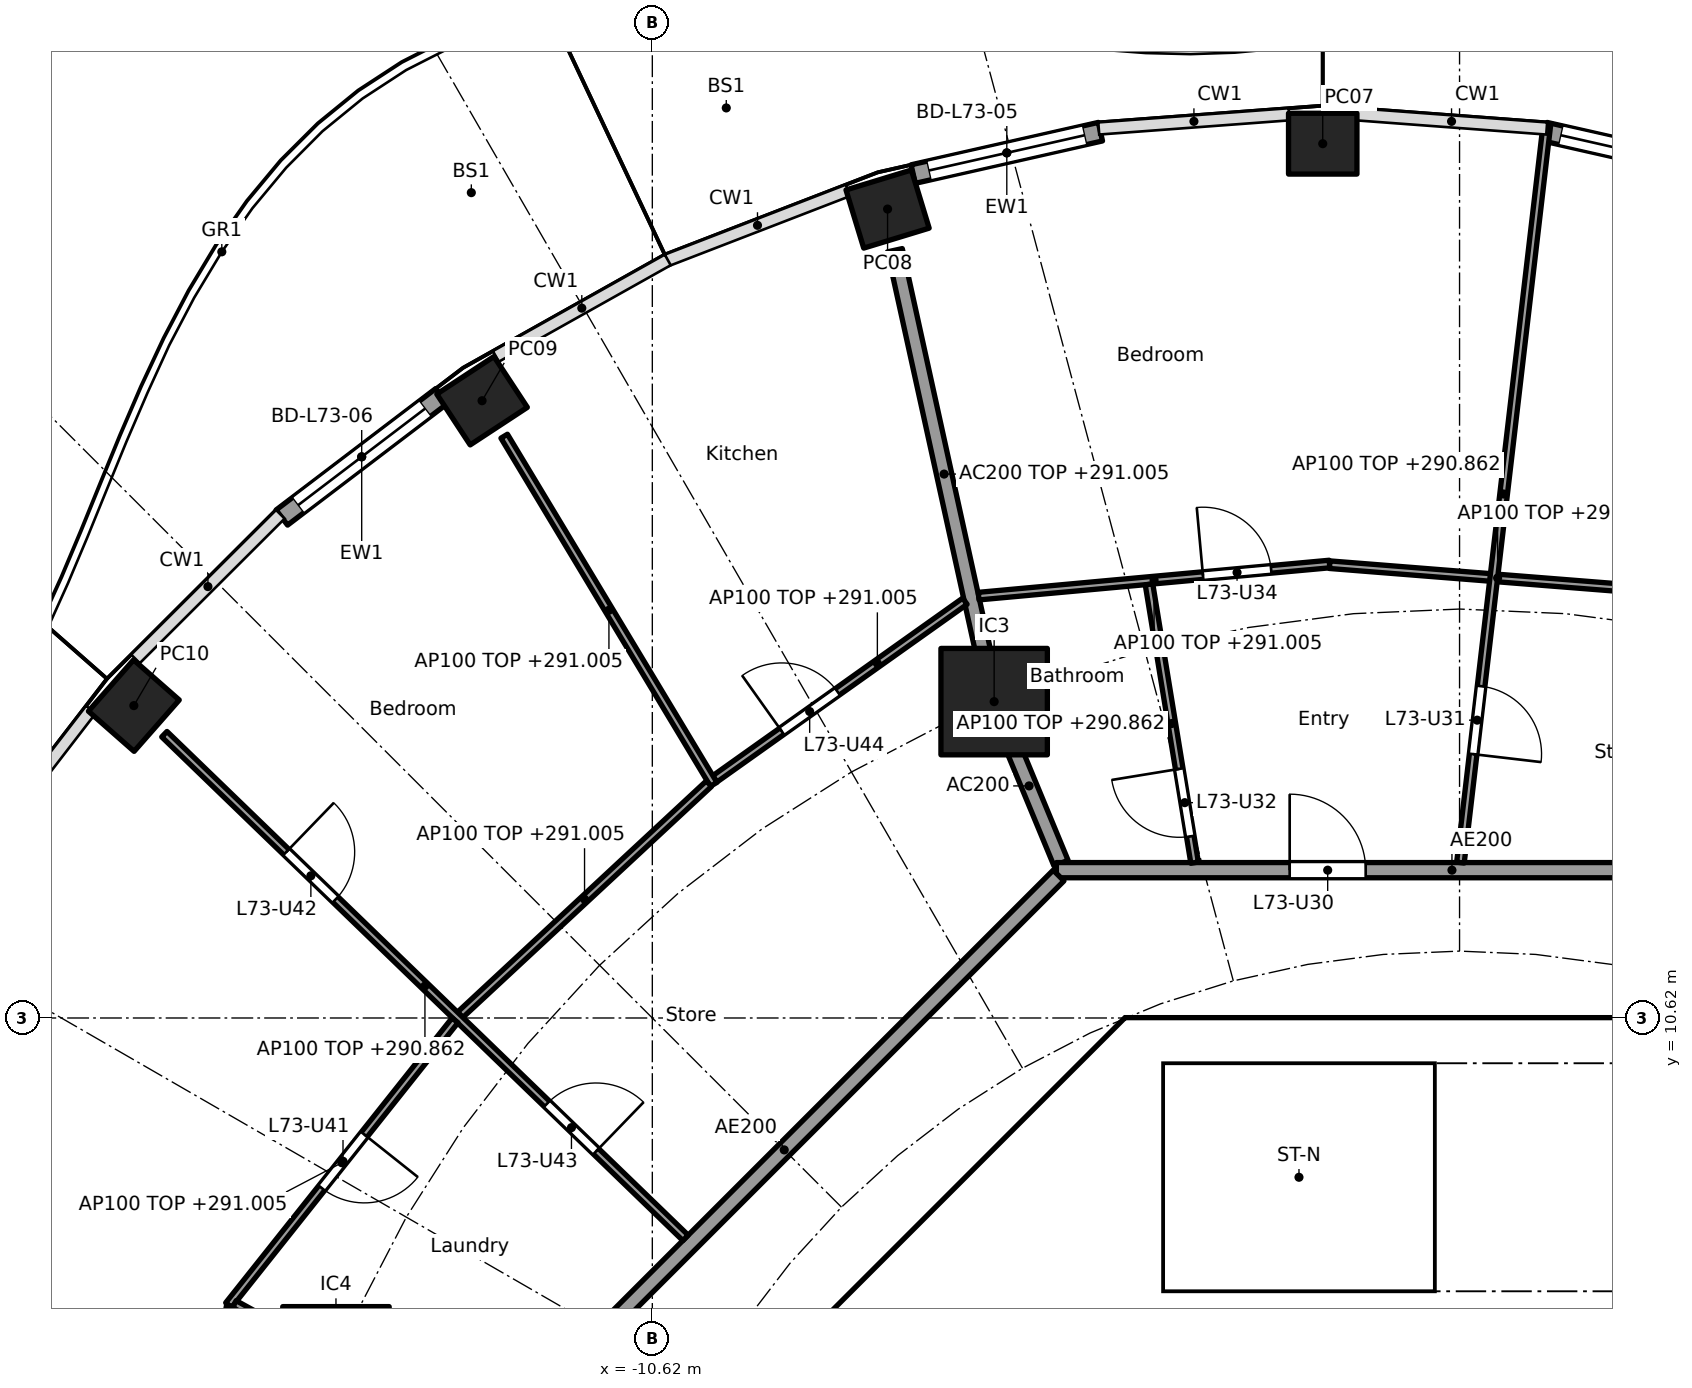
"""IFC4 building model, lengths in metres.
Left out: names, types, materials, properties, quantities, classifications, styles, units other than length and angle.
Written with IfcOpenShell. Run it as: python <this file> out.ifc"""

import sys

from ifc_helpers import new_model, si_unit, direction, frame, frame_2d, origin, origin_2d, place, context, subcontext, project, spatial, polyline, rectangle, hollow_rectangle, outline, extrude, element, fill, save


model = new_model("IFC4")
c1 = context("Model", 3, precision=1e-05, world=origin(), true_north=direction((0.0, 1.0)))
c2 = subcontext(c1, "Body", "Model", "MODEL_VIEW")
j1 = project(units=[si_unit("LENGTHUNIT", "METRE"), si_unit("PLANEANGLEUNIT", "RADIAN")], contexts=[c1])
p1 = place(None, origin())
s1 = spatial("IfcSite", under=j1, at=p1, CompositionType="ELEMENT")
p2 = place(p1, origin())
s2 = spatial("IfcBuilding", under=s1, at=p2, CompositionType="ELEMENT")
p3 = place(p2, frame((0.0, 0.0, 288.1)))
s3 = spatial("IfcBuildingStorey", under=s2, at=p3, CompositionType="ELEMENT", Elevation=288.1)
for number, where, z_axis, x_axis in (
    (1, (-1.8, 22.122, 0.0), (0.0, 0.0, 1.0), (-1.0, 0.0, 0.0)),
    (2, (-7.525, 21.262, 0.0), (0.0, 0.0, 1.0), (-0.957, -0.292, 0.0)),
    (3, (-12.86, 18.741, 0.0), (0.0, 0.0, 1.0), (-0.836, -0.549, 0.0)),
    (4, (-17.441, 14.73, 0.0), (0.0, 0.0, 1.0), (-0.66, -0.751, 0.0)),
):
    element("IfcColumn", number, at=place(p3, frame(where, z_axis=z_axis, x_axis=x_axis)), inside=s3, PredefinedType="COLUMN", context=c2, shape_type="SweptSolid", body=[
        extrude(hollow_rectangle(XDim=0.9, YDim=0.8, WallThickness=0.028, at=origin_2d()), origin(), (0.0, 0.0, 1.0), 3.7),
    ])
for number, where, z_axis, x_axis in (
    (5, (-6.123, 14.782, 0.0), (0.0, 0.0, 1.0), (1.0, 0.0, 0.0)),
    (6, (-14.782, 6.123, 0.0), (0.0, 0.0, 1.0), (1.0, 0.0, 0.0)),
):
    element("IfcColumn", number, at=place(p3, frame(where, z_axis=z_axis, x_axis=x_axis)), inside=s3, PredefinedType="COLUMN", context=c2, shape_type="SweptSolid", body=[
        extrude(rectangle(XDim=1.4, YDim=1.4, at=origin_2d()), origin(), (0.0, 0.0, 1.0), 3.7),
    ])
p4 = place(p3, frame((1.125, 22.28, 0.0), z_axis=(0.0, 0.0, 1.0), x_axis=(0.97531487046, -0.22081871175, 0.0)))
e7 = element("IfcWall", 7, at=p4, inside=s3, PredefinedType="SOLIDWALL", context=c2, shape_type="SweptSolid", body=[
    extrude(rectangle(XDim=2.525, YDim=0.25, at=frame_2d((1.263, 0.0))), origin(), (0.0, 0.0, 1.0), 3.44),
])
p5 = place(p4, frame((0.213, 0.0, 0.0)))
e8 = element("IfcOpeningElement", 8, at=p5, cuts=e7, PredefinedType="OPENING", context=c2, shape_type="SweptSolid", body=[
    extrude(rectangle(XDim=2.1, YDim=2.4, at=frame_2d((1.05, 1.2))), frame((0.0, 0.135, 0.0), z_axis=(0.0, -1.0, 0.0), x_axis=(1.0, 0.0, 0.0)), (0.0, 0.0, 1.0), 0.27),
])
p6 = place(p3, frame((-7.188, 21.723, 0.0), z_axis=(0.0, 0.0, 1.0), x_axis=(0.975319584032, 0.220797891756, 0.0)))
e9 = element("IfcWall", 9, at=p6, inside=s3, PredefinedType="SOLIDWALL", context=c2, shape_type="SweptSolid", body=[
    extrude(rectangle(XDim=2.525, YDim=0.25, at=frame_2d((1.263, 0.0))), origin(), (0.0, 0.0, 1.0), 3.44),
])
p7 = place(p6, frame((0.213, 0.0, 0.0)))
e10 = element("IfcOpeningElement", 10, at=p7, cuts=e9, PredefinedType="OPENING", context=c2, shape_type="SweptSolid", body=[
    extrude(rectangle(XDim=2.1, YDim=2.4, at=frame_2d((1.05, 1.2))), frame((0.0, 0.135, 0.0), z_axis=(0.0, -1.0, 0.0), x_axis=(1.0, 0.0, 0.0)), (0.0, 0.0, 1.0), 0.27),
])
p8 = place(p3, frame((-15.495, 17.204, 0.0), z_axis=(0.0, 0.0, 1.0), x_axis=(0.796010739377, 0.605282498339, 0.0)))
e11 = element("IfcWall", 11, at=p8, inside=s3, PredefinedType="SOLIDWALL", context=c2, shape_type="SweptSolid", body=[
    extrude(rectangle(XDim=2.641, YDim=0.25, at=frame_2d((1.32, 0.0))), origin(), (0.0, 0.0, 1.0), 3.44),
])
p9 = place(p8, frame((0.27, 0.0, 0.0)))
e12 = element("IfcOpeningElement", 12, at=p9, cuts=e11, PredefinedType="OPENING", context=c2, shape_type="SweptSolid", body=[
    extrude(rectangle(XDim=2.1, YDim=2.4, at=frame_2d((1.05, 1.2))), frame((0.0, 0.135, 0.0), z_axis=(0.0, -1.0, 0.0), x_axis=(1.0, 0.0, 0.0)), (0.0, 0.0, 1.0), 0.27),
])
p10 = place(p3, frame((-4.613, 9.988, 0.0), z_axis=(0.0, 0.0, 1.0), x_axis=(-0.707106781187, -0.707106781187, 0.0)))
e13 = element("IfcWall", 13, at=p10, inside=s3, PredefinedType="SHEAR", context=c2, shape_type="SweptSolid", body=[
    extrude(rectangle(XDim=7.602, YDim=0.6, at=frame_2d((3.801, 0.0))), origin(), (0.0, 0.0, 1.0), 3.44),
])
p11 = place(p10, frame((0.351, 0.0, 0.0)))
e14 = element("IfcOpeningElement", 14, at=p11, cuts=e13, PredefinedType="OPENING", context=c2, shape_type="SweptSolid", body=[
    extrude(rectangle(XDim=1.1, YDim=2.1, at=frame_2d((0.55, 1.05))), frame((0.0, 0.31, 0.0), z_axis=(0.0, -1.0, 0.0), x_axis=(1.0, 0.0, 0.0)), (0.0, 0.0, 1.0), 0.62),
])
p12 = place(p3, frame((-5.8, 4.3, 0.0), z_axis=(0.0, 0.0, 1.0), x_axis=(0.0, 1.0, 0.0)))
e15 = element("IfcWall", 15, at=p12, inside=s3, PredefinedType="PARTITIONING", context=c2, shape_type="SweptSolid", body=[
    extrude(rectangle(XDim=3.927, YDim=0.15, at=frame_2d((1.963, 0.0))), origin(), (0.0, 0.0, 1.0), 3.44),
])
p13 = place(p12, frame((1.551, 0.0, 0.0)))
e16 = element("IfcOpeningElement", 16, at=p13, cuts=e15, PredefinedType="OPENING", context=c2, shape_type="SweptSolid", body=[
    extrude(rectangle(XDim=0.9, YDim=2.1, at=frame_2d((0.45, 1.05))), frame((0.0, 0.085, 0.0), z_axis=(0.0, -1.0, 0.0), x_axis=(1.0, 0.0, 0.0)), (0.0, 0.0, 1.0), 0.17),
])
p14 = place(p3, origin())
e17 = element("IfcWall", 17, at=p14, inside=s3, PredefinedType="SHEAR", context=c2, shape_type="SweptSolid", body=[
    extrude(outline(polyline([(-4.152, 10.025), (-4.401, 9.776), (-4.825, 10.2), (-4.401, 10.625), (4.401, 10.625), (4.825, 10.2), (4.401, 9.776), (4.152, 10.025), (-4.152, 10.025)])), origin(), (0.0, 0.0, 1.0), 3.44),
])
p15 = place(p3, origin())
e18 = element("IfcWall", 18, at=p15, inside=s3, PredefinedType="SOLIDWALL", context=c2, shape_type="SweptSolid", body=[
    extrude(outline(polyline([(-3.9, 7.025), (-4.1, 7.025), (-4.1, 10.025), (-3.9, 10.025), (-3.9, 7.025)])), origin(), (0.0, 0.0, 1.0), 3.44),
])
p16 = place(p3, origin())
e19 = element("IfcWall", 19, at=p16, inside=s3, PredefinedType="SOLIDWALL", context=c2, shape_type="SweptSolid", body=[
    extrude(outline(polyline([(4.1, 6.5), (-4.1, 6.5), (-4.1, 7.025), (4.1, 7.025), (4.1, 6.5)])), origin(), (0.0, 0.0, 1.0), 3.44),
])
p17 = place(p3, frame((-5.243, 12.657, 0.0), z_axis=(0.0, 0.0, 1.0), x_axis=(-0.38273085373, 0.923859888513, 0.0)))
e20 = element("IfcWall", 20, at=p17, inside=s3, PredefinedType="PARTITIONING", context=c2, shape_type="SweptSolid", body=[
    extrude(rectangle(XDim=2.199, YDim=0.2, at=frame_2d((1.1, 0.0))), origin(), (0.0, 0.0, 1.0), 3.44),
])
p18 = place(p3, frame((-6.134, 14.831, 0.0), z_axis=(0.0, 0.0, 1.0), x_axis=(-0.214842475666, 0.976648714047, 0.0)))
e21 = element("IfcWall", 21, at=p18, inside=s3, PredefinedType="PARTITIONING", context=c2, shape_type="SweptSolid", body=[
    extrude(rectangle(XDim=6.031, YDim=0.2, at=frame_2d((3.015, 0.0))), origin(), (0.0, 0.0, 1.0), 2.905),
])
p19 = place(p3, frame((5.104, 12.565, 0.0), z_axis=(0.0, 0.0, 1.0), x_axis=(-1.0, 0.0, 0.0)))
e22 = element("IfcWall", 22, at=p19, inside=s3, PredefinedType="PARTITIONING", context=c2, shape_type="SweptSolid", body=[
    extrude(rectangle(XDim=10.409, YDim=0.2, at=frame_2d((5.205, 0.0))), origin(), (0.0, 0.0, 1.0), 3.44),
])
p20 = place(p19, frame((6.339, 0.0, 0.0)))
e23 = element("IfcOpeningElement", 23, at=p20, cuts=e22, PredefinedType="OPENING", context=c2, shape_type="SweptSolid", body=[
    extrude(rectangle(XDim=1.0, YDim=2.1, at=frame_2d((0.5, 1.05))), frame((0.0, 0.11, 0.0), z_axis=(0.0, -1.0, 0.0), x_axis=(1.0, 0.0, 0.0)), (0.0, 0.0, 1.0), 0.22),
])
p21 = place(p3, frame((-5.275, 12.494, 0.0), z_axis=(0.0, 0.0, 1.0), x_axis=(-0.707106781187, -0.707106781187, 0.0)))
e24 = element("IfcWall", 24, at=p21, inside=s3, PredefinedType="PARTITIONING", context=c2, shape_type="SweptSolid", body=[
    extrude(rectangle(XDim=10.209, YDim=0.2, at=frame_2d((5.104, 0.0))), origin(), (0.0, 0.0, 1.0), 3.44),
])
p22 = place(p3, frame((2.713, 16.233, 0.0), z_axis=(0.0, 0.0, 1.0), x_axis=(-0.996870142942, 0.079056423588, 0.0)))
e25 = element("IfcWall", 25, at=p22, inside=s3, PredefinedType="PARTITIONING", context=c2, shape_type="SweptSolid", body=[
    extrude(rectangle(XDim=4.438, YDim=0.1, at=frame_2d((2.219, 0.0))), origin(), (0.0, 0.0, 1.0), 2.905),
])
p23 = place(p3, frame((0.012, 12.664, 0.0), z_axis=(0.0, 0.0, 1.0), x_axis=(0.11636251357, 0.993206808996, 0.0)))
e26 = element("IfcWall", 26, at=p23, inside=s3, PredefinedType="PARTITIONING", context=c2, shape_type="SweptSolid", body=[
    extrude(rectangle(XDim=9.765, YDim=0.1, at=frame_2d((4.882, 0.0))), origin(), (0.0, 0.0, 1.0), 2.762),
])
p24 = place(p23, frame((1.437, 0.0, 0.0)))
e27 = element("IfcOpeningElement", 27, at=p24, cuts=e26, PredefinedType="OPENING", context=c2, shape_type="SweptSolid", body=[
    extrude(rectangle(XDim=0.9, YDim=2.1, at=frame_2d((0.45, 1.05))), frame((0.0, 0.06, 0.0), z_axis=(0.0, -1.0, 0.0), x_axis=(1.0, 0.0, 0.0)), (0.0, 0.0, 1.0), 0.12),
])
p25 = place(p3, frame((-1.711, 16.592, 0.0), z_axis=(0.0, 0.0, 1.0), x_axis=(-0.995843837247, -0.091077175065, 0.0)))
e28 = element("IfcWall", 28, at=p25, inside=s3, PredefinedType="PARTITIONING", context=c2, shape_type="SweptSolid", body=[
    extrude(rectangle(XDim=4.635, YDim=0.1, at=frame_2d((2.317, 0.0))), origin(), (0.0, 0.0, 1.0), 2.905),
])
p26 = place(p25, frame((0.771, 0.0, 0.0)))
e29 = element("IfcOpeningElement", 29, at=p26, cuts=e28, PredefinedType="OPENING", context=c2, shape_type="SweptSolid", body=[
    extrude(rectangle(XDim=0.9, YDim=2.1, at=frame_2d((0.45, 1.05))), frame((0.0, 0.06, 0.0), z_axis=(0.0, -1.0, 0.0), x_axis=(1.0, 0.0, 0.0)), (0.0, 0.0, 1.0), 0.12),
])
p27 = place(p3, frame((-3.486, 12.663, 0.0), z_axis=(0.0, 0.0, 1.0), x_axis=(-0.161602751674, 0.986855891532, 0.0)))
e30 = element("IfcWall", 30, at=p27, inside=s3, PredefinedType="PARTITIONING", context=c2, shape_type="SweptSolid", body=[
    extrude(rectangle(XDim=3.71, YDim=0.1, at=frame_2d((1.855, 0.0))), origin(), (0.0, 0.0, 1.0), 2.762),
])
p28 = place(p27, frame((0.35, 0.0, 0.0)))
e31 = element("IfcOpeningElement", 31, at=p28, cuts=e30, PredefinedType="OPENING", context=c2, shape_type="SweptSolid", body=[
    extrude(rectangle(XDim=0.9, YDim=2.1, at=frame_2d((0.45, 1.05))), frame((0.0, 0.06, 0.0), z_axis=(0.0, -1.0, 0.0), x_axis=(1.0, 0.0, 0.0)), (0.0, 0.0, 1.0), 0.12),
])
p29 = place(p3, frame((-6.508, 16.103, 0.0), z_axis=(0.0, 0.0, 1.0), x_axis=(-0.815202203556, -0.579176456114, 0.0)))
e32 = element("IfcWall", 32, at=p29, inside=s3, PredefinedType="PARTITIONING", context=c2, shape_type="SweptSolid", body=[
    extrude(rectangle(XDim=4.036, YDim=0.1, at=frame_2d((2.018, 0.0))), origin(), (0.0, 0.0, 1.0), 2.905),
])
p30 = place(p29, frame((2.055, 0.0, 0.0)))
e33 = element("IfcOpeningElement", 33, at=p30, cuts=e32, PredefinedType="OPENING", context=c2, shape_type="SweptSolid", body=[
    extrude(rectangle(XDim=0.9, YDim=2.1, at=frame_2d((0.45, 1.05))), frame((0.0, 0.06, 0.0), z_axis=(0.0, -1.0, 0.0), x_axis=(1.0, 0.0, 0.0)), (0.0, 0.0, 1.0), 0.12),
])
p31 = place(p3, frame((-9.813, 13.693, 0.0), z_axis=(0.0, 0.0, 1.0), x_axis=(-0.515509511815, 0.856883856324, 0.0)))
e34 = element("IfcWall", 34, at=p31, inside=s3, PredefinedType="PARTITIONING", context=c2, shape_type="SweptSolid", body=[
    extrude(rectangle(XDim=5.346, YDim=0.1, at=frame_2d((2.673, 0.0))), origin(), (0.0, 0.0, 1.0), 2.905),
])
p32 = place(p3, frame((-9.875, 13.702, 0.0), z_axis=(0.0, 0.0, 1.0), x_axis=(-0.732618266441, -0.680639754699, 0.0)))
e35 = element("IfcWall", 35, at=p32, inside=s3, PredefinedType="PARTITIONING", context=c2, shape_type="SweptSolid", body=[
    extrude(rectangle(XDim=4.467, YDim=0.1, at=frame_2d((2.233, 0.0))), origin(), (0.0, 0.0, 1.0), 2.905),
])
p33 = place(p3, frame((-10.183, 7.727, 0.0), z_axis=(0.0, 0.0, 1.0), x_axis=(-0.719063433856, 0.694944442449, 0.0)))
e36 = element("IfcWall", 36, at=p33, inside=s3, PredefinedType="PARTITIONING", context=c2, shape_type="SweptSolid", body=[
    extrude(rectangle(XDim=9.535, YDim=0.1, at=frame_2d((4.768, 0.0))), origin(), (0.0, 0.0, 1.0), 2.762),
])
p34 = place(p33, frame((6.405, 0.0, 0.0)))
e37 = element("IfcOpeningElement", 37, at=p34, cuts=e36, PredefinedType="OPENING", context=c2, shape_type="SweptSolid", body=[
    extrude(rectangle(XDim=0.9, YDim=2.1, at=frame_2d((0.45, 1.05))), frame((0.0, 0.06, 0.0), z_axis=(0.0, -1.0, 0.0), x_axis=(1.0, 0.0, 0.0)), (0.0, 0.0, 1.0), 0.12),
])
p35 = place(p33, frame((1.637, 0.0, 0.0)))
e38 = element("IfcOpeningElement", 38, at=p35, cuts=e36, PredefinedType="OPENING", context=c2, shape_type="SweptSolid", body=[
    extrude(rectangle(XDim=0.9, YDim=2.1, at=frame_2d((0.45, 1.05))), frame((0.0, 0.06, 0.0), z_axis=(0.0, -1.0, 0.0), x_axis=(1.0, 0.0, 0.0)), (0.0, 0.0, 1.0), 0.12),
])
p36 = place(p3, frame((-13.216, 10.589, 0.0), z_axis=(0.0, 0.0, 1.0), x_axis=(-0.622272178674, -0.782800955319, 0.0)))
e39 = element("IfcWall", 39, at=p36, inside=s3, PredefinedType="PARTITIONING", context=c2, shape_type="SweptSolid", body=[
    extrude(rectangle(XDim=4.786, YDim=0.1, at=frame_2d((2.393, 0.0))), origin(), (0.0, 0.0, 1.0), 2.905),
])
p37 = place(p36, frame((1.918, 0.0, 0.0)))
e40 = element("IfcOpeningElement", 40, at=p37, cuts=e39, PredefinedType="OPENING", context=c2, shape_type="SweptSolid", body=[
    extrude(rectangle(XDim=0.9, YDim=2.1, at=frame_2d((0.45, 1.05))), frame((0.0, 0.06, 0.0), z_axis=(0.0, -1.0, 0.0), x_axis=(1.0, 0.0, 0.0)), (0.0, 0.0, 1.0), 0.12),
])
p38 = place(p3, frame((-14.826, 6.147, 0.0), z_axis=(0.0, 0.0, 1.0), x_axis=(-0.876411496923, 0.481562963755, 0.0)))
e41 = element("IfcWall", 41, at=p38, inside=s3, PredefinedType="PARTITIONING", context=c2, shape_type="SweptSolid", body=[
    extrude(rectangle(XDim=1.475, YDim=0.1, at=frame_2d((0.738, 0.0))), origin(), (0.0, 0.0, 1.0), 3.44),
])
p39 = place(p3, frame((-16.172, 6.832, 0.0), z_axis=(0.0, 0.0, 1.0), x_axis=(-0.185671645069, -0.982611846162, 0.0)))
e42 = element("IfcWall", 42, at=p39, inside=s3, PredefinedType="PARTITIONING", context=c2, shape_type="SweptSolid", body=[
    extrude(rectangle(XDim=4.401, YDim=0.1, at=frame_2d((2.2, 0.0))), origin(), (0.0, 0.0, 1.0), 2.905),
])
p40 = place(p39, frame((1.75, 0.0, 0.0)))
e43 = element("IfcOpeningElement", 43, at=p40, cuts=e42, PredefinedType="OPENING", context=c2, shape_type="SweptSolid", body=[
    extrude(rectangle(XDim=0.9, YDim=2.1, at=frame_2d((0.45, 1.05))), frame((0.0, 0.06, 0.0), z_axis=(0.0, -1.0, 0.0), x_axis=(1.0, 0.0, 0.0)), (0.0, 0.0, 1.0), 0.12),
])
p41 = place(p5, origin())
e44 = element("IfcDoor", 44, at=p41, inside=s3, OperationType="SLIDING_TO_LEFT", PredefinedType="DOOR", context=c2, shape_type="SweptSolid", body=[
    extrude(rectangle(XDim=2.1, YDim=2.4, at=frame_2d((1.05, 1.2))), frame((0.0, 0.025, 0.0), z_axis=(0.0, -1.0, 0.0), x_axis=(1.0, 0.0, 0.0)), (0.0, 0.0, 1.0), 0.05),
])
fill(e8, e44)
p42 = place(p7, origin())
e45 = element("IfcDoor", 45, at=p42, inside=s3, OperationType="SLIDING_TO_LEFT", PredefinedType="DOOR", context=c2, shape_type="SweptSolid", body=[
    extrude(rectangle(XDim=2.1, YDim=2.4, at=frame_2d((1.05, 1.2))), frame((0.0, 0.025, 0.0), z_axis=(0.0, -1.0, 0.0), x_axis=(1.0, 0.0, 0.0)), (0.0, 0.0, 1.0), 0.05),
])
fill(e10, e45)
p43 = place(p9, origin())
e46 = element("IfcDoor", 46, at=p43, inside=s3, OperationType="SLIDING_TO_LEFT", PredefinedType="DOOR", context=c2, shape_type="SweptSolid", body=[
    extrude(rectangle(XDim=2.1, YDim=2.4, at=frame_2d((1.05, 1.2))), frame((0.0, 0.025, 0.0), z_axis=(0.0, -1.0, 0.0), x_axis=(1.0, 0.0, 0.0)), (0.0, 0.0, 1.0), 0.05),
])
fill(e12, e46)
p44 = place(p11, origin())
e47 = element("IfcDoor", 47, at=p44, inside=s3, OperationType="SINGLE_SWING_LEFT", PredefinedType="DOOR", context=c2, shape_type="SweptSolid", body=[
    extrude(rectangle(XDim=1.1, YDim=2.1, at=frame_2d((0.55, 1.05))), frame((0.0, 0.025, 0.0), z_axis=(0.0, -1.0, 0.0), x_axis=(1.0, 0.0, 0.0)), (0.0, 0.0, 1.0), 0.05),
])
fill(e14, e47)
p45 = place(p20, frame((1.0, 0.0, 0.0), x_axis=(-1.0, 0.0, 0.0)))
e48 = element("IfcDoor", 48, at=p45, inside=s3, OperationType="SINGLE_SWING_LEFT", PredefinedType="DOOR", context=c2, shape_type="SweptSolid", body=[
    extrude(rectangle(XDim=1.0, YDim=2.1, at=frame_2d((0.5, 1.05))), frame((0.0, 0.025, 0.0), z_axis=(0.0, -1.0, 0.0), x_axis=(1.0, 0.0, 0.0)), (0.0, 0.0, 1.0), 0.05),
])
fill(e23, e48)
p46 = place(p24, frame((0.9, 0.0, 0.0), x_axis=(-1.0, 0.0, 0.0)))
e49 = element("IfcDoor", 49, at=p46, inside=s3, OperationType="SINGLE_SWING_RIGHT", PredefinedType="DOOR", context=c2, shape_type="SweptSolid", body=[
    extrude(rectangle(XDim=0.9, YDim=2.1, at=frame_2d((0.45, 1.05))), frame((0.0, 0.025, 0.0), z_axis=(0.0, -1.0, 0.0), x_axis=(1.0, 0.0, 0.0)), (0.0, 0.0, 1.0), 0.05),
])
fill(e27, e49)
p47 = place(p28, origin())
e50 = element("IfcDoor", 50, at=p47, inside=s3, OperationType="SINGLE_SWING_RIGHT", PredefinedType="DOOR", context=c2, shape_type="SweptSolid", body=[
    extrude(rectangle(XDim=0.9, YDim=2.1, at=frame_2d((0.45, 1.05))), frame((0.0, 0.025, 0.0), z_axis=(0.0, -1.0, 0.0), x_axis=(1.0, 0.0, 0.0)), (0.0, 0.0, 1.0), 0.05),
])
fill(e31, e50)
p48 = place(p26, frame((0.9, 0.0, 0.0), x_axis=(-1.0, 0.0, 0.0)))
e51 = element("IfcDoor", 51, at=p48, inside=s3, OperationType="SINGLE_SWING_LEFT", PredefinedType="DOOR", context=c2, shape_type="SweptSolid", body=[
    extrude(rectangle(XDim=0.9, YDim=2.1, at=frame_2d((0.45, 1.05))), frame((0.0, 0.025, 0.0), z_axis=(0.0, -1.0, 0.0), x_axis=(1.0, 0.0, 0.0)), (0.0, 0.0, 1.0), 0.05),
])
fill(e29, e51)
p49 = place(p37, origin())
e52 = element("IfcDoor", 52, at=p49, inside=s3, OperationType="SINGLE_SWING_LEFT", PredefinedType="DOOR", context=c2, shape_type="SweptSolid", body=[
    extrude(rectangle(XDim=0.9, YDim=2.1, at=frame_2d((0.45, 1.05))), frame((0.0, 0.025, 0.0), z_axis=(0.0, -1.0, 0.0), x_axis=(1.0, 0.0, 0.0)), (0.0, 0.0, 1.0), 0.05),
])
fill(e40, e52)
p50 = place(p34, frame((0.9, 0.0, 0.0), x_axis=(-1.0, 0.0, 0.0)))
e53 = element("IfcDoor", 53, at=p50, inside=s3, OperationType="SINGLE_SWING_LEFT", PredefinedType="DOOR", context=c2, shape_type="SweptSolid", body=[
    extrude(rectangle(XDim=0.9, YDim=2.1, at=frame_2d((0.45, 1.05))), frame((0.0, 0.025, 0.0), z_axis=(0.0, -1.0, 0.0), x_axis=(1.0, 0.0, 0.0)), (0.0, 0.0, 1.0), 0.05),
])
fill(e37, e53)
p51 = place(p35, frame((0.9, 0.0, 0.0), x_axis=(-1.0, 0.0, 0.0)))
e54 = element("IfcDoor", 54, at=p51, inside=s3, OperationType="SINGLE_SWING_RIGHT", PredefinedType="DOOR", context=c2, shape_type="SweptSolid", body=[
    extrude(rectangle(XDim=0.9, YDim=2.1, at=frame_2d((0.45, 1.05))), frame((0.0, 0.025, 0.0), z_axis=(0.0, -1.0, 0.0), x_axis=(1.0, 0.0, 0.0)), (0.0, 0.0, 1.0), 0.05),
])
fill(e38, e54)
p52 = place(p30, frame((0.9, 0.0, 0.0), x_axis=(-1.0, 0.0, 0.0)))
e55 = element("IfcDoor", 55, at=p52, inside=s3, OperationType="SINGLE_SWING_LEFT", PredefinedType="DOOR", context=c2, shape_type="SweptSolid", body=[
    extrude(rectangle(XDim=0.9, YDim=2.1, at=frame_2d((0.45, 1.05))), frame((0.0, 0.025, 0.0), z_axis=(0.0, -1.0, 0.0), x_axis=(1.0, 0.0, 0.0)), (0.0, 0.0, 1.0), 0.05),
])
fill(e33, e55)
save(model, sys.argv[1])
